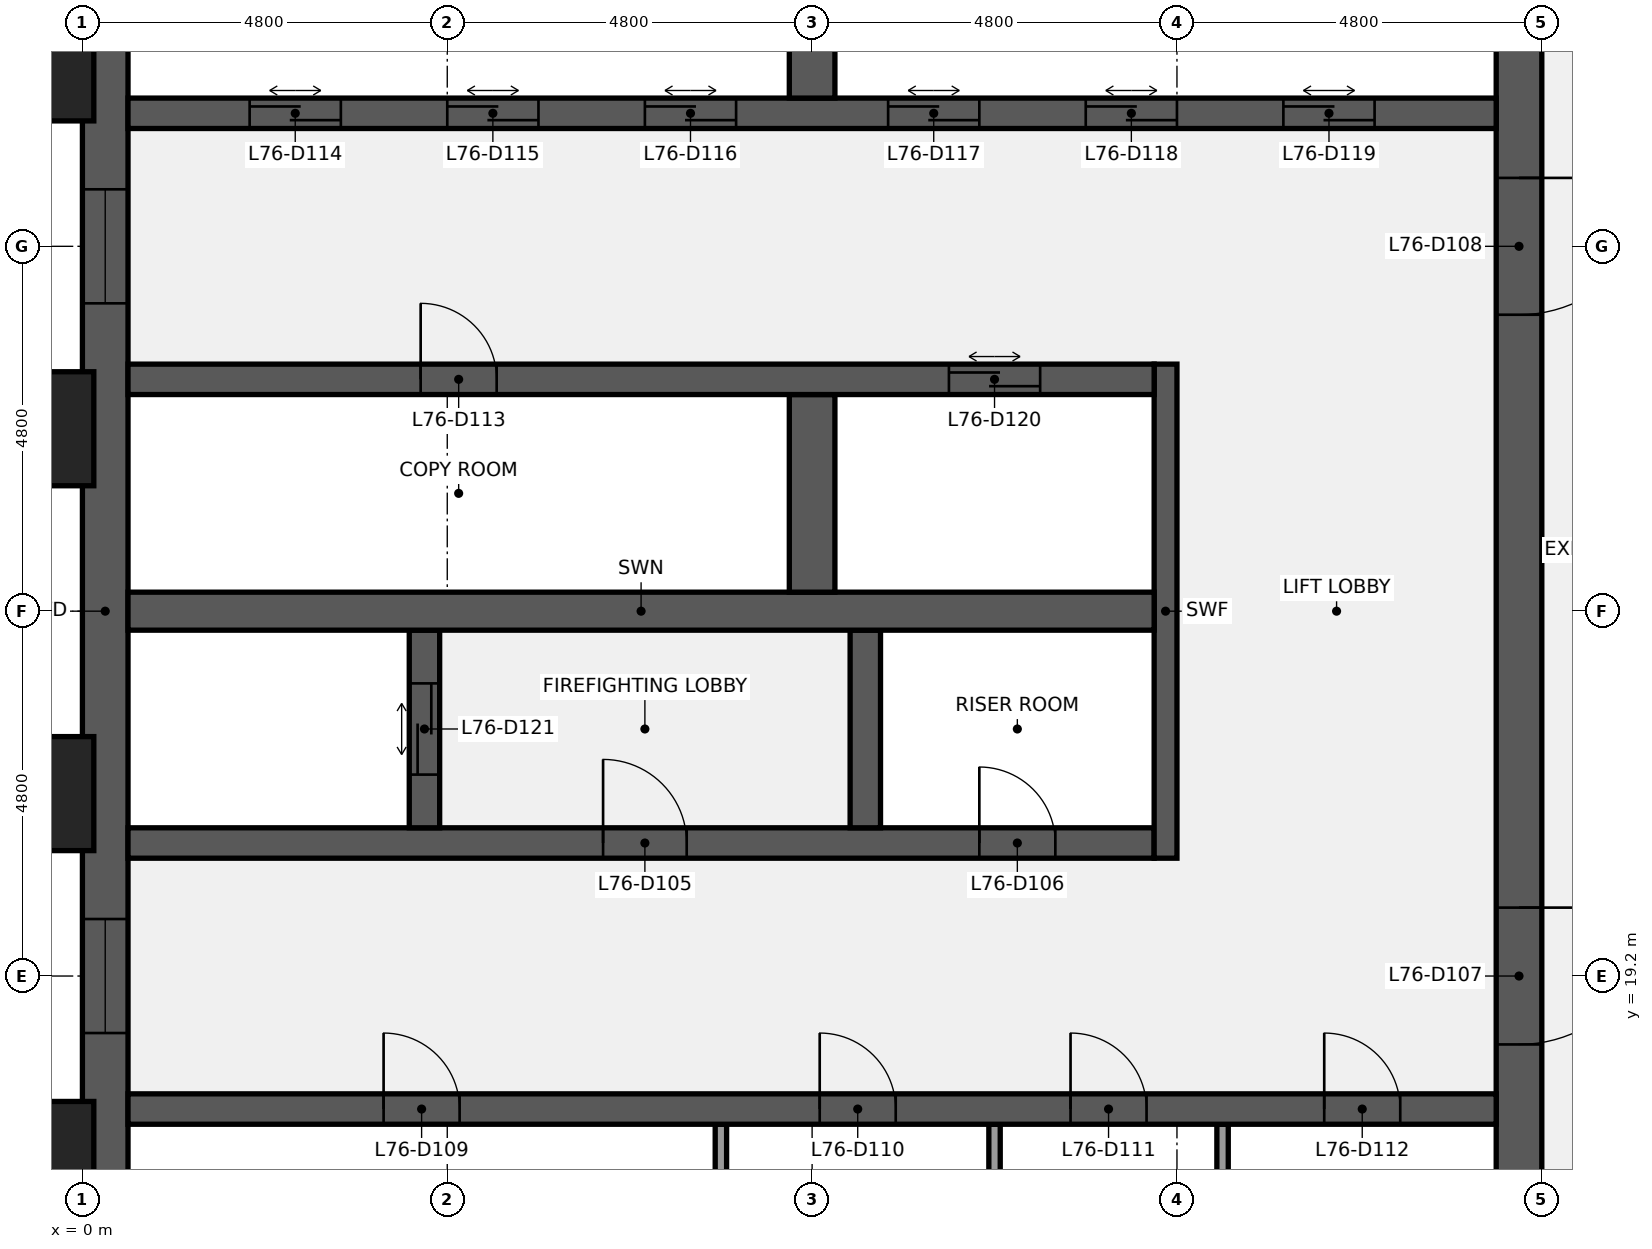
"""IFC4 building model, lengths in metres.
Left out: names, types, materials, properties, quantities, classifications, styles, units other than length and angle.
Written with IfcOpenShell. Run it as: python <this file> out.ifc"""

import sys

from ifc_helpers import new_model, si_unit, direction, frame, frame_2d, origin, origin_2d, place, context, subcontext, project, spatial, rectangle, extrude, element, fill, save


model = new_model("IFC4")
c1 = context("Model", 3, precision=1e-05, world=origin(), true_north=direction((0.0, 1.0)))
c2 = subcontext(c1, "Body", "Model", "MODEL_VIEW")
j1 = project(units=[si_unit("LENGTHUNIT", "METRE"), si_unit("PLANEANGLEUNIT", "RADIAN")], contexts=[c1])
p1 = place(None, origin())
s1 = spatial("IfcSite", under=j1, at=p1, CompositionType="ELEMENT")
p2 = place(p1, origin())
s2 = spatial("IfcBuilding", under=s1, at=p2, CompositionType="ELEMENT")
p3 = place(p2, frame((0.0, 0.0, 342.3)))
s3 = spatial("IfcBuildingStorey", under=s2, at=p3, CompositionType="ELEMENT", Elevation=342.3)
p4 = place(p3, frame((0.3, 9.6, 0.0), z_axis=(0.0, 0.0, 1.0), x_axis=(0.0, 1.0, 0.0)))
e1 = element("IfcWall", 1, at=p4, inside=s3, PredefinedType="SHEAR", context=c2, shape_type="SweptSolid", body=[
    extrude(rectangle(XDim=28.8, YDim=0.6, at=frame_2d((14.4, 0.0))), origin(), (0.0, 0.0, 1.0), 3.84),
])
p5 = place(p4, frame((8.85, 0.0, 0.9)))
e2 = element("IfcOpeningElement", 2, at=p5, cuts=e1, PredefinedType="OPENING", context=c2, shape_type="SweptSolid", body=[
    extrude(rectangle(XDim=1.5, YDim=1.5, at=frame_2d((0.75, 0.75))), frame((0.0, 0.31, 0.0), z_axis=(0.0, -1.0, 0.0), x_axis=(1.0, 0.0, 0.0)), (0.0, 0.0, 1.0), 0.62),
])
p6 = place(p4, frame((18.45, 0.0, 0.9)))
e3 = element("IfcOpeningElement", 3, at=p6, cuts=e1, PredefinedType="OPENING", context=c2, shape_type="SweptSolid", body=[
    extrude(rectangle(XDim=1.5, YDim=1.5, at=frame_2d((0.75, 0.75))), frame((0.0, 0.31, 0.0), z_axis=(0.0, -1.0, 0.0), x_axis=(1.0, 0.0, 0.0)), (0.0, 0.0, 1.0), 0.62),
])
p7 = place(p3, frame((18.9, 38.4, 0.0), z_axis=(0.0, 0.0, 1.0), x_axis=(0.0, -1.0, 0.0)))
e4 = element("IfcWall", 4, at=p7, inside=s3, PredefinedType="SHEAR", context=c2, shape_type="SweptSolid", body=[
    extrude(rectangle(XDim=28.8, YDim=0.6, at=frame_2d((14.4, 0.0))), origin(), (0.0, 0.0, 1.0), 3.84),
])
p8 = place(p7, frame((18.3, 0.0, 0.0)))
e5 = element("IfcOpeningElement", 5, at=p8, cuts=e4, PredefinedType="OPENING", context=c2, shape_type="SweptSolid", body=[
    extrude(rectangle(XDim=1.8, YDim=2.1, at=frame_2d((0.9, 1.05))), frame((0.0, 0.31, 0.0), z_axis=(0.0, -1.0, 0.0), x_axis=(1.0, 0.0, 0.0)), (0.0, 0.0, 1.0), 0.62),
])
p9 = place(p7, frame((8.7, 0.0, 0.0)))
e6 = element("IfcOpeningElement", 6, at=p9, cuts=e4, PredefinedType="OPENING", context=c2, shape_type="SweptSolid", body=[
    extrude(rectangle(XDim=1.8, YDim=2.1, at=frame_2d((0.9, 1.05))), frame((0.0, 0.31, 0.0), z_axis=(0.0, -1.0, 0.0), x_axis=(1.0, 0.0, 0.0)), (0.0, 0.0, 1.0), 0.62),
])
for number, where, z_axis, x_axis in (
    (7, (8.4, 14.65, 0.0), (0.0, 0.0, 1.0), (0.0, 1.0, 0.0)),
    (8, (12.0, 14.65, 0.0), (0.0, 0.0, 1.0), (0.0, 1.0, 0.0)),
    (9, (15.0, 14.65, 0.0), (0.0, 0.0, 1.0), (0.0, 1.0, 0.0)),
):
    element("IfcWall", number, at=place(p3, frame(where, z_axis=z_axis, x_axis=x_axis)), inside=s3, PredefinedType="PARTITIONING", context=c2, shape_type="SweptSolid", body=[
        extrude(rectangle(XDim=2.6, YDim=0.15, at=frame_2d((1.3, 0.0))), origin(), (0.0, 0.0, 1.0), 3.84),
    ])
p10 = place(p3, frame((0.6, 17.45, 0.0), z_axis=(0.0, 0.0, 1.0), x_axis=(1.0, 0.0, 0.0)))
e10 = element("IfcWall", 10, at=p10, inside=s3, PredefinedType="SHEAR", context=c2, shape_type="SweptSolid", body=[
    extrude(rectangle(XDim=18.0, YDim=0.4, at=frame_2d((9.0, 0.0))), origin(), (0.0, 0.0, 1.0), 3.84),
])
p11 = place(p10, frame((3.363, 0.0, 0.0)))
e11 = element("IfcOpeningElement", 11, at=p11, cuts=e10, PredefinedType="OPENING", context=c2, shape_type="SweptSolid", body=[
    extrude(rectangle(XDim=1.0, YDim=2.1, at=frame_2d((0.5, 1.05))), frame((0.0, 0.21, 0.0), z_axis=(0.0, -1.0, 0.0), x_axis=(1.0, 0.0, 0.0)), (0.0, 0.0, 1.0), 0.42),
])
p12 = place(p10, frame((9.1, 0.0, 0.0)))
e12 = element("IfcOpeningElement", 12, at=p12, cuts=e10, PredefinedType="OPENING", context=c2, shape_type="SweptSolid", body=[
    extrude(rectangle(XDim=1.0, YDim=2.1, at=frame_2d((0.5, 1.05))), frame((0.0, 0.21, 0.0), z_axis=(0.0, -1.0, 0.0), x_axis=(1.0, 0.0, 0.0)), (0.0, 0.0, 1.0), 0.42),
])
p13 = place(p10, frame((12.4, 0.0, 0.0)))
e13 = element("IfcOpeningElement", 13, at=p13, cuts=e10, PredefinedType="OPENING", context=c2, shape_type="SweptSolid", body=[
    extrude(rectangle(XDim=1.0, YDim=2.1, at=frame_2d((0.5, 1.05))), frame((0.0, 0.21, 0.0), z_axis=(0.0, -1.0, 0.0), x_axis=(1.0, 0.0, 0.0)), (0.0, 0.0, 1.0), 0.42),
])
p14 = place(p10, frame((15.738, 0.0, 0.0)))
e14 = element("IfcOpeningElement", 14, at=p14, cuts=e10, PredefinedType="OPENING", context=c2, shape_type="SweptSolid", body=[
    extrude(rectangle(XDim=1.0, YDim=2.1, at=frame_2d((0.5, 1.05))), frame((0.0, 0.21, 0.0), z_axis=(0.0, -1.0, 0.0), x_axis=(1.0, 0.0, 0.0)), (0.0, 0.0, 1.0), 0.42),
])
p15 = place(p3, frame((0.6, 20.95, 0.0), z_axis=(0.0, 0.0, 1.0), x_axis=(1.0, 0.0, 0.0)))
e15 = element("IfcWall", 15, at=p15, inside=s3, PredefinedType="SHEAR", context=c2, shape_type="SweptSolid", body=[
    extrude(rectangle(XDim=13.5, YDim=0.4, at=frame_2d((6.75, 0.0))), origin(), (0.0, 0.0, 1.0), 3.84),
])
p16 = place(p15, frame((6.25, 0.0, 0.0)))
e16 = element("IfcOpeningElement", 16, at=p16, cuts=e15, PredefinedType="OPENING", context=c2, shape_type="SweptSolid", body=[
    extrude(rectangle(XDim=1.1, YDim=2.1, at=frame_2d((0.55, 1.05))), frame((0.0, 0.21, 0.0), z_axis=(0.0, -1.0, 0.0), x_axis=(1.0, 0.0, 0.0)), (0.0, 0.0, 1.0), 0.42),
])
p17 = place(p15, frame((11.2, 0.0, 0.0)))
e17 = element("IfcOpeningElement", 17, at=p17, cuts=e15, PredefinedType="OPENING", context=c2, shape_type="SweptSolid", body=[
    extrude(rectangle(XDim=1.0, YDim=2.1, at=frame_2d((0.5, 1.05))), frame((0.0, 0.21, 0.0), z_axis=(0.0, -1.0, 0.0), x_axis=(1.0, 0.0, 0.0)), (0.0, 0.0, 1.0), 0.42),
])
p18 = place(p3, frame((14.25, 20.75, 0.0), z_axis=(0.0, 0.0, 1.0), x_axis=(0.0, 1.0, 0.0)))
e18 = element("IfcWall", 18, at=p18, inside=s3, PredefinedType="SHEAR", context=c2, shape_type="SweptSolid", body=[
    extrude(rectangle(XDim=6.5, YDim=0.3, at=frame_2d((3.25, 0.0))), origin(), (0.0, 0.0, 1.0), 3.84),
])
p19 = place(p3, frame((4.5, 21.15, 0.0), z_axis=(0.0, 0.0, 1.0), x_axis=(0.0, 1.0, 0.0)))
e19 = element("IfcWall", 19, at=p19, inside=s3, PredefinedType="SHEAR", context=c2, shape_type="SweptSolid", body=[
    extrude(rectangle(XDim=2.6, YDim=0.4, at=frame_2d((1.3, 0.0))), origin(), (0.0, 0.0, 1.0), 3.84),
])
p20 = place(p19, frame((0.7, 0.0, 0.0)))
e20 = element("IfcOpeningElement", 20, at=p20, cuts=e19, PredefinedType="OPENING", context=c2, shape_type="SweptSolid", body=[
    extrude(rectangle(XDim=1.2, YDim=2.1, at=frame_2d((0.6, 1.05))), frame((0.0, 0.21, 0.0), z_axis=(0.0, -1.0, 0.0), x_axis=(1.0, 0.0, 0.0)), (0.0, 0.0, 1.0), 0.42),
])
p21 = place(p3, frame((10.3, 21.15, 0.0), z_axis=(0.0, 0.0, 1.0), x_axis=(0.0, 1.0, 0.0)))
e21 = element("IfcWall", 21, at=p21, inside=s3, PredefinedType="SHEAR", context=c2, shape_type="SweptSolid", body=[
    extrude(rectangle(XDim=2.6, YDim=0.4, at=frame_2d((1.3, 0.0))), origin(), (0.0, 0.0, 1.0), 3.84),
])
p22 = place(p3, frame((0.6, 24.0, 0.0), z_axis=(0.0, 0.0, 1.0), x_axis=(1.0, 0.0, 0.0)))
e22 = element("IfcWall", 22, at=p22, inside=s3, PredefinedType="SHEAR", context=c2, shape_type="SweptSolid", body=[
    extrude(rectangle(XDim=13.5, YDim=0.5, at=frame_2d((6.75, 0.0))), origin(), (0.0, 0.0, 1.0), 3.84),
])
p23 = place(p3, frame((9.6, 24.25, 0.0), z_axis=(0.0, 0.0, 1.0), x_axis=(0.0, 1.0, 0.0)))
e23 = element("IfcWall", 23, at=p23, inside=s3, PredefinedType="SHEAR", context=c2, shape_type="SweptSolid", body=[
    extrude(rectangle(XDim=2.6, YDim=0.6, at=frame_2d((1.3, 0.0))), origin(), (0.0, 0.0, 1.0), 3.84),
])
p24 = place(p3, frame((0.6, 27.05, 0.0), z_axis=(0.0, 0.0, 1.0), x_axis=(1.0, 0.0, 0.0)))
e24 = element("IfcWall", 24, at=p24, inside=s3, PredefinedType="SHEAR", context=c2, shape_type="SweptSolid", body=[
    extrude(rectangle(XDim=13.5, YDim=0.4, at=frame_2d((6.75, 0.0))), origin(), (0.0, 0.0, 1.0), 3.84),
])
p25 = place(p24, frame((3.85, 0.0, 0.0)))
e25 = element("IfcOpeningElement", 25, at=p25, cuts=e24, PredefinedType="OPENING", context=c2, shape_type="SweptSolid", body=[
    extrude(rectangle(XDim=1.0, YDim=2.1, at=frame_2d((0.5, 1.05))), frame((0.0, 0.21, 0.0), z_axis=(0.0, -1.0, 0.0), x_axis=(1.0, 0.0, 0.0)), (0.0, 0.0, 1.0), 0.42),
])
p26 = place(p24, frame((10.8, 0.0, 0.0)))
e26 = element("IfcOpeningElement", 26, at=p26, cuts=e24, PredefinedType="OPENING", context=c2, shape_type="SweptSolid", body=[
    extrude(rectangle(XDim=1.2, YDim=2.1, at=frame_2d((0.6, 1.05))), frame((0.0, 0.21, 0.0), z_axis=(0.0, -1.0, 0.0), x_axis=(1.0, 0.0, 0.0)), (0.0, 0.0, 1.0), 0.42),
])
p27 = place(p3, frame((0.6, 30.55, 0.0), z_axis=(0.0, 0.0, 1.0), x_axis=(1.0, 0.0, 0.0)))
e27 = element("IfcWall", 27, at=p27, inside=s3, PredefinedType="SHEAR", context=c2, shape_type="SweptSolid", body=[
    extrude(rectangle(XDim=18.0, YDim=0.4, at=frame_2d((9.0, 0.0))), origin(), (0.0, 0.0, 1.0), 3.84),
])
p28 = place(p27, frame((1.6, 0.0, 0.0)))
e28 = element("IfcOpeningElement", 28, at=p28, cuts=e27, PredefinedType="OPENING", context=c2, shape_type="SweptSolid", body=[
    extrude(rectangle(XDim=1.2, YDim=2.1, at=frame_2d((0.6, 1.05))), frame((0.0, 0.21, 0.0), z_axis=(0.0, -1.0, 0.0), x_axis=(1.0, 0.0, 0.0)), (0.0, 0.0, 1.0), 0.42),
])
p29 = place(p27, frame((4.2, 0.0, 0.0)))
e29 = element("IfcOpeningElement", 29, at=p29, cuts=e27, PredefinedType="OPENING", context=c2, shape_type="SweptSolid", body=[
    extrude(rectangle(XDim=1.2, YDim=2.1, at=frame_2d((0.6, 1.05))), frame((0.0, 0.21, 0.0), z_axis=(0.0, -1.0, 0.0), x_axis=(1.0, 0.0, 0.0)), (0.0, 0.0, 1.0), 0.42),
])
p30 = place(p27, frame((6.8, 0.0, 0.0)))
e30 = element("IfcOpeningElement", 30, at=p30, cuts=e27, PredefinedType="OPENING", context=c2, shape_type="SweptSolid", body=[
    extrude(rectangle(XDim=1.2, YDim=2.1, at=frame_2d((0.6, 1.05))), frame((0.0, 0.21, 0.0), z_axis=(0.0, -1.0, 0.0), x_axis=(1.0, 0.0, 0.0)), (0.0, 0.0, 1.0), 0.42),
])
p31 = place(p27, frame((10.0, 0.0, 0.0)))
e31 = element("IfcOpeningElement", 31, at=p31, cuts=e27, PredefinedType="OPENING", context=c2, shape_type="SweptSolid", body=[
    extrude(rectangle(XDim=1.2, YDim=2.1, at=frame_2d((0.6, 1.05))), frame((0.0, 0.21, 0.0), z_axis=(0.0, -1.0, 0.0), x_axis=(1.0, 0.0, 0.0)), (0.0, 0.0, 1.0), 0.42),
])
p32 = place(p27, frame((12.6, 0.0, 0.0)))
e32 = element("IfcOpeningElement", 32, at=p32, cuts=e27, PredefinedType="OPENING", context=c2, shape_type="SweptSolid", body=[
    extrude(rectangle(XDim=1.2, YDim=2.1, at=frame_2d((0.6, 1.05))), frame((0.0, 0.21, 0.0), z_axis=(0.0, -1.0, 0.0), x_axis=(1.0, 0.0, 0.0)), (0.0, 0.0, 1.0), 0.42),
])
p33 = place(p27, frame((15.2, 0.0, 0.0)))
e33 = element("IfcOpeningElement", 33, at=p33, cuts=e27, PredefinedType="OPENING", context=c2, shape_type="SweptSolid", body=[
    extrude(rectangle(XDim=1.2, YDim=2.1, at=frame_2d((0.6, 1.05))), frame((0.0, 0.21, 0.0), z_axis=(0.0, -1.0, 0.0), x_axis=(1.0, 0.0, 0.0)), (0.0, 0.0, 1.0), 0.42),
])
p34 = place(p3, frame((9.6, 30.75, 0.0), z_axis=(0.0, 0.0, 1.0), x_axis=(0.0, 1.0, 0.0)))
e34 = element("IfcWall", 34, at=p34, inside=s3, PredefinedType="SHEAR", context=c2, shape_type="SweptSolid", body=[
    extrude(rectangle(XDim=2.6, YDim=0.6, at=frame_2d((1.3, 0.0))), origin(), (0.0, 0.0, 1.0), 3.84),
])
for number, where, z_axis, x_axis in (
    (35, (-0.75, 16.8, 0.0), (0.0, 0.0, 1.0), (0.0, 1.0, 0.0)),
    (36, (-0.75, 21.6, 0.0), (0.0, 0.0, 1.0), (0.0, 1.0, 0.0)),
    (37, (-0.75, 26.4, 0.0), (0.0, 0.0, 1.0), (0.0, 1.0, 0.0)),
    (38, (-0.75, 31.2, 0.0), (0.0, 0.0, 1.0), (0.0, 1.0, 0.0)),
):
    element("IfcColumn", number, at=place(p3, frame(where, z_axis=z_axis, x_axis=x_axis)), inside=s3, PredefinedType="PILASTER", context=c2, shape_type="SweptSolid", body=[
        extrude(rectangle(XDim=1.8, YDim=1.5, at=origin_2d()), origin(), (0.0, 0.0, 1.0), 4.0),
    ])
p35 = place(p16, origin())
e39 = element("IfcDoor", 39, at=p35, inside=s3, OperationType="SINGLE_SWING_LEFT", PredefinedType="DOOR", context=c2, shape_type="SweptSolid", body=[
    extrude(rectangle(XDim=1.1, YDim=2.1, at=frame_2d((0.55, 1.05))), frame((0.0, 0.025, 0.0), z_axis=(0.0, -1.0, 0.0), x_axis=(1.0, 0.0, 0.0)), (0.0, 0.0, 1.0), 0.05),
])
fill(e16, e39)
p36 = place(p17, origin())
e40 = element("IfcDoor", 40, at=p36, inside=s3, OperationType="SINGLE_SWING_LEFT", PredefinedType="DOOR", context=c2, shape_type="SweptSolid", body=[
    extrude(rectangle(XDim=1.0, YDim=2.1, at=frame_2d((0.5, 1.05))), frame((0.0, 0.025, 0.0), z_axis=(0.0, -1.0, 0.0), x_axis=(1.0, 0.0, 0.0)), (0.0, 0.0, 1.0), 0.05),
])
fill(e17, e40)
p37 = place(p8, origin())
e41 = element("IfcDoor", 41, at=p37, inside=s3, OperationType="DOUBLE_DOOR_SINGLE_SWING", PredefinedType="DOOR", context=c2, shape_type="SweptSolid", body=[
    extrude(rectangle(XDim=1.8, YDim=2.1, at=frame_2d((0.9, 1.05))), frame((0.0, 0.025, 0.0), z_axis=(0.0, -1.0, 0.0), x_axis=(1.0, 0.0, 0.0)), (0.0, 0.0, 1.0), 0.05),
])
fill(e5, e41)
p38 = place(p9, origin())
e42 = element("IfcDoor", 42, at=p38, inside=s3, OperationType="DOUBLE_DOOR_SINGLE_SWING", PredefinedType="DOOR", context=c2, shape_type="SweptSolid", body=[
    extrude(rectangle(XDim=1.8, YDim=2.1, at=frame_2d((0.9, 1.05))), frame((0.0, 0.025, 0.0), z_axis=(0.0, -1.0, 0.0), x_axis=(1.0, 0.0, 0.0)), (0.0, 0.0, 1.0), 0.05),
])
fill(e6, e42)
p39 = place(p11, origin())
e43 = element("IfcDoor", 43, at=p39, inside=s3, OperationType="SINGLE_SWING_LEFT", PredefinedType="DOOR", context=c2, shape_type="SweptSolid", body=[
    extrude(rectangle(XDim=1.0, YDim=2.1, at=frame_2d((0.5, 1.05))), frame((0.0, 0.025, 0.0), z_axis=(0.0, -1.0, 0.0), x_axis=(1.0, 0.0, 0.0)), (0.0, 0.0, 1.0), 0.05),
])
fill(e11, e43)
p40 = place(p12, origin())
e44 = element("IfcDoor", 44, at=p40, inside=s3, OperationType="SINGLE_SWING_LEFT", PredefinedType="DOOR", context=c2, shape_type="SweptSolid", body=[
    extrude(rectangle(XDim=1.0, YDim=2.1, at=frame_2d((0.5, 1.05))), frame((0.0, 0.025, 0.0), z_axis=(0.0, -1.0, 0.0), x_axis=(1.0, 0.0, 0.0)), (0.0, 0.0, 1.0), 0.05),
])
fill(e12, e44)
p41 = place(p13, origin())
e45 = element("IfcDoor", 45, at=p41, inside=s3, OperationType="SINGLE_SWING_LEFT", PredefinedType="DOOR", context=c2, shape_type="SweptSolid", body=[
    extrude(rectangle(XDim=1.0, YDim=2.1, at=frame_2d((0.5, 1.05))), frame((0.0, 0.025, 0.0), z_axis=(0.0, -1.0, 0.0), x_axis=(1.0, 0.0, 0.0)), (0.0, 0.0, 1.0), 0.05),
])
fill(e13, e45)
p42 = place(p14, origin())
e46 = element("IfcDoor", 46, at=p42, inside=s3, OperationType="SINGLE_SWING_LEFT", PredefinedType="DOOR", context=c2, shape_type="SweptSolid", body=[
    extrude(rectangle(XDim=1.0, YDim=2.1, at=frame_2d((0.5, 1.05))), frame((0.0, 0.025, 0.0), z_axis=(0.0, -1.0, 0.0), x_axis=(1.0, 0.0, 0.0)), (0.0, 0.0, 1.0), 0.05),
])
fill(e14, e46)
p43 = place(p25, origin())
e47 = element("IfcDoor", 47, at=p43, inside=s3, OperationType="SINGLE_SWING_LEFT", PredefinedType="DOOR", context=c2, shape_type="SweptSolid", body=[
    extrude(rectangle(XDim=1.0, YDim=2.1, at=frame_2d((0.5, 1.05))), frame((0.0, 0.025, 0.0), z_axis=(0.0, -1.0, 0.0), x_axis=(1.0, 0.0, 0.0)), (0.0, 0.0, 1.0), 0.05),
])
fill(e25, e47)
p44 = place(p28, origin())
e48 = element("IfcDoor", 48, at=p44, inside=s3, OperationType="DOUBLE_DOOR_SLIDING", PredefinedType="DOOR", context=c2, shape_type="SweptSolid", body=[
    extrude(rectangle(XDim=1.2, YDim=2.1, at=frame_2d((0.6, 1.05))), frame((0.0, 0.025, 0.0), z_axis=(0.0, -1.0, 0.0), x_axis=(1.0, 0.0, 0.0)), (0.0, 0.0, 1.0), 0.05),
])
fill(e28, e48)
p45 = place(p29, origin())
e49 = element("IfcDoor", 49, at=p45, inside=s3, OperationType="DOUBLE_DOOR_SLIDING", PredefinedType="DOOR", context=c2, shape_type="SweptSolid", body=[
    extrude(rectangle(XDim=1.2, YDim=2.1, at=frame_2d((0.6, 1.05))), frame((0.0, 0.025, 0.0), z_axis=(0.0, -1.0, 0.0), x_axis=(1.0, 0.0, 0.0)), (0.0, 0.0, 1.0), 0.05),
])
fill(e29, e49)
p46 = place(p30, origin())
e50 = element("IfcDoor", 50, at=p46, inside=s3, OperationType="DOUBLE_DOOR_SLIDING", PredefinedType="DOOR", context=c2, shape_type="SweptSolid", body=[
    extrude(rectangle(XDim=1.2, YDim=2.1, at=frame_2d((0.6, 1.05))), frame((0.0, 0.025, 0.0), z_axis=(0.0, -1.0, 0.0), x_axis=(1.0, 0.0, 0.0)), (0.0, 0.0, 1.0), 0.05),
])
fill(e30, e50)
p47 = place(p31, origin())
e51 = element("IfcDoor", 51, at=p47, inside=s3, OperationType="DOUBLE_DOOR_SLIDING", PredefinedType="DOOR", context=c2, shape_type="SweptSolid", body=[
    extrude(rectangle(XDim=1.2, YDim=2.1, at=frame_2d((0.6, 1.05))), frame((0.0, 0.025, 0.0), z_axis=(0.0, -1.0, 0.0), x_axis=(1.0, 0.0, 0.0)), (0.0, 0.0, 1.0), 0.05),
])
fill(e31, e51)
p48 = place(p32, origin())
e52 = element("IfcDoor", 52, at=p48, inside=s3, OperationType="DOUBLE_DOOR_SLIDING", PredefinedType="DOOR", context=c2, shape_type="SweptSolid", body=[
    extrude(rectangle(XDim=1.2, YDim=2.1, at=frame_2d((0.6, 1.05))), frame((0.0, 0.025, 0.0), z_axis=(0.0, -1.0, 0.0), x_axis=(1.0, 0.0, 0.0)), (0.0, 0.0, 1.0), 0.05),
])
fill(e32, e52)
p49 = place(p33, origin())
e53 = element("IfcDoor", 53, at=p49, inside=s3, OperationType="DOUBLE_DOOR_SLIDING", PredefinedType="DOOR", context=c2, shape_type="SweptSolid", body=[
    extrude(rectangle(XDim=1.2, YDim=2.1, at=frame_2d((0.6, 1.05))), frame((0.0, 0.025, 0.0), z_axis=(0.0, -1.0, 0.0), x_axis=(1.0, 0.0, 0.0)), (0.0, 0.0, 1.0), 0.05),
])
fill(e33, e53)
p50 = place(p26, origin())
e54 = element("IfcDoor", 54, at=p50, inside=s3, OperationType="DOUBLE_DOOR_SLIDING", PredefinedType="DOOR", context=c2, shape_type="SweptSolid", body=[
    extrude(rectangle(XDim=1.2, YDim=2.1, at=frame_2d((0.6, 1.05))), frame((0.0, 0.025, 0.0), z_axis=(0.0, -1.0, 0.0), x_axis=(1.0, 0.0, 0.0)), (0.0, 0.0, 1.0), 0.05),
])
fill(e26, e54)
p51 = place(p20, origin())
e55 = element("IfcDoor", 55, at=p51, inside=s3, OperationType="DOUBLE_DOOR_SLIDING", PredefinedType="DOOR", context=c2, shape_type="SweptSolid", body=[
    extrude(rectangle(XDim=1.2, YDim=2.1, at=frame_2d((0.6, 1.05))), frame((0.0, 0.025, 0.0), z_axis=(0.0, -1.0, 0.0), x_axis=(1.0, 0.0, 0.0)), (0.0, 0.0, 1.0), 0.05),
])
fill(e20, e55)
p52 = place(p5, origin())
e56 = element("IfcWindow", 56, at=p52, inside=s3, PartitioningType="SINGLE_PANEL", PredefinedType="WINDOW", context=c2, shape_type="SweptSolid", body=[
    extrude(rectangle(XDim=1.5, YDim=1.5, at=frame_2d((0.75, 0.75))), frame((0.0, 0.03, 0.0), z_axis=(0.0, -1.0, 0.0), x_axis=(1.0, 0.0, 0.0)), (0.0, 0.0, 1.0), 0.06),
])
fill(e2, e56)
p53 = place(p6, origin())
e57 = element("IfcWindow", 57, at=p53, inside=s3, PartitioningType="SINGLE_PANEL", PredefinedType="WINDOW", context=c2, shape_type="SweptSolid", body=[
    extrude(rectangle(XDim=1.5, YDim=1.5, at=frame_2d((0.75, 0.75))), frame((0.0, 0.03, 0.0), z_axis=(0.0, -1.0, 0.0), x_axis=(1.0, 0.0, 0.0)), (0.0, 0.0, 1.0), 0.06),
])
fill(e3, e57)
save(model, sys.argv[1])
